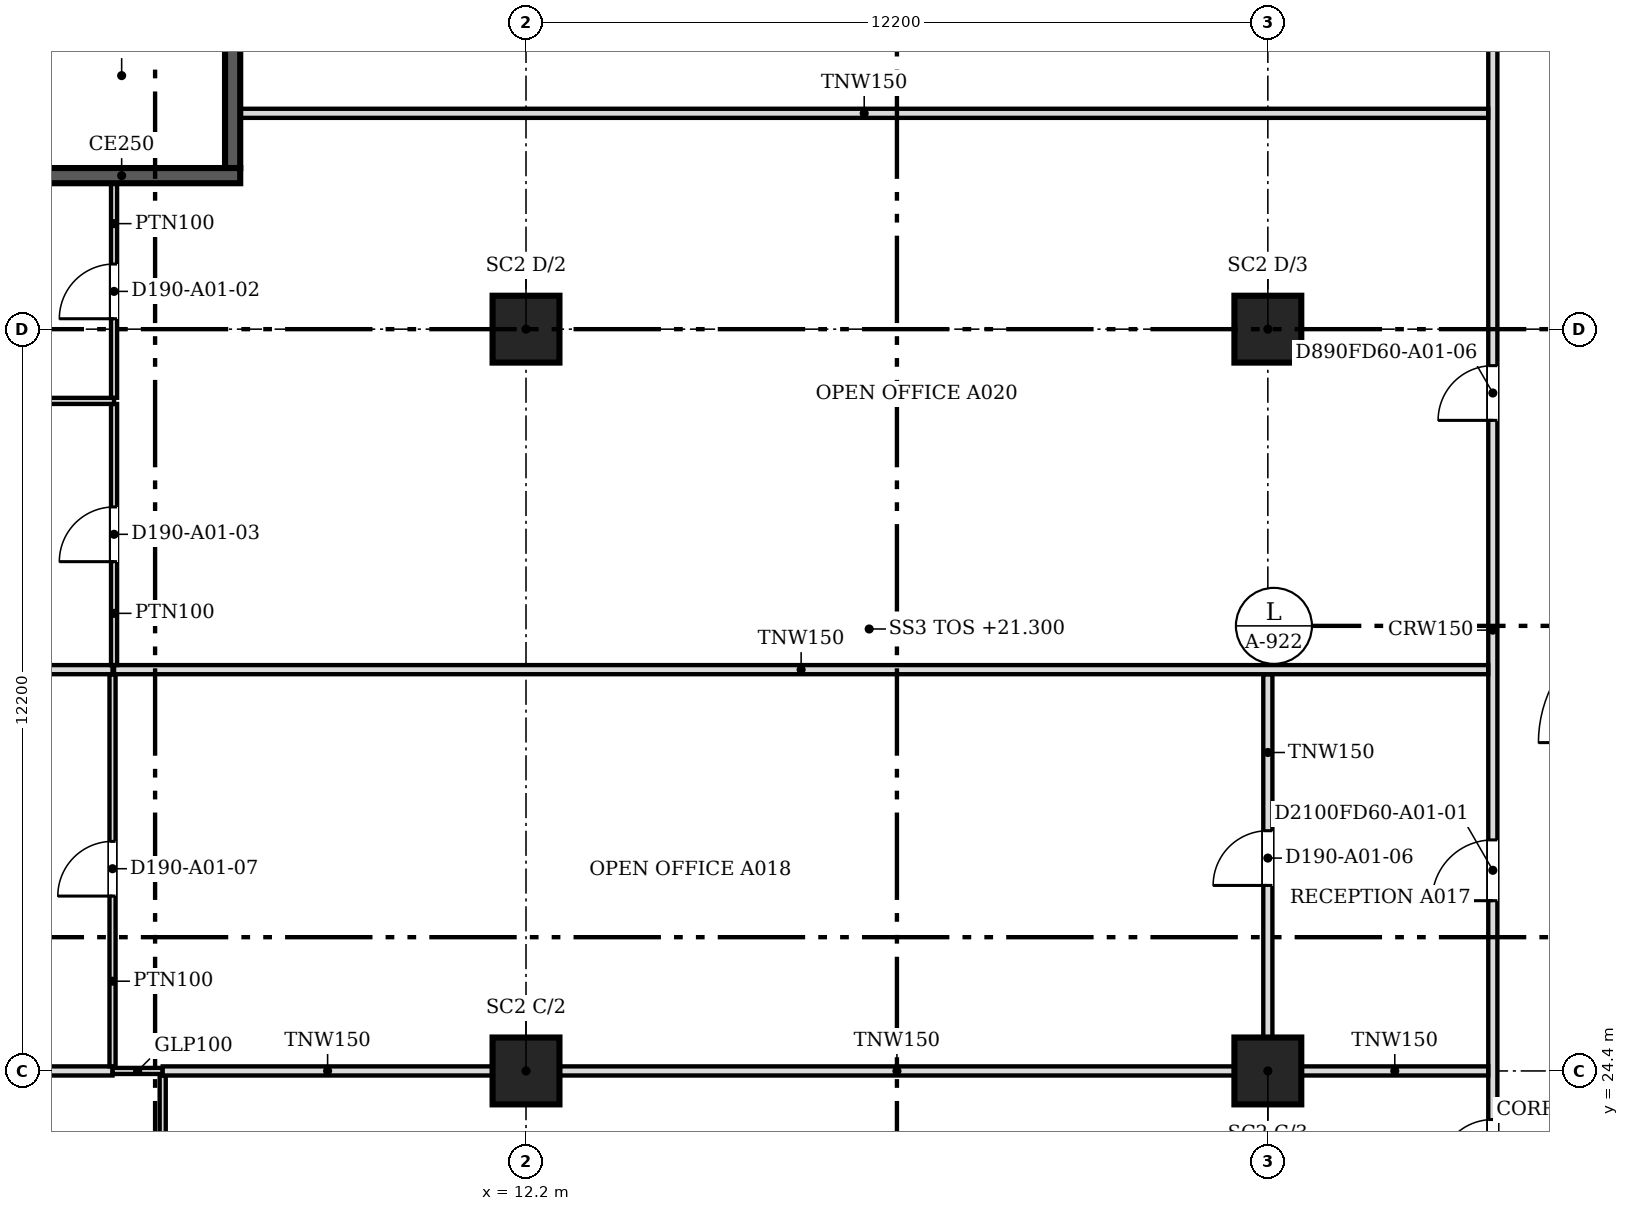
"""IFC4 building model, lengths in metres.
Left out: names, types, materials, properties, quantities, classifications, styles, units other than length and angle.
Written with IfcOpenShell. Run it as: python <this file> out.ifc"""

import sys

from ifc_helpers import new_model, si_unit, direction, frame, frame_2d, origin, origin_2d, place, context, subcontext, project, spatial, rectangle, extrude, source, transform, mapped, element, fill, save


model = new_model("IFC4")
c1 = context("Model", 3, precision=1e-05, world=origin(), true_north=direction((0.0, 1.0)))
c2 = subcontext(c1, "Body", "Model", "MODEL_VIEW")
j1 = project(units=[si_unit("LENGTHUNIT", "METRE"), si_unit("PLANEANGLEUNIT", "RADIAN")], contexts=[c1])
p1 = place(None, origin())
s1 = spatial("IfcSite", under=j1, at=p1, CompositionType="ELEMENT")
p2 = place(p1, origin())
s2 = spatial("IfcBuilding", under=s1, at=p2, CompositionType="ELEMENT")
p3 = place(p2, frame((0.0, 0.0, 21.3)))
s3 = spatial("IfcBuildingStorey", under=s2, at=p3, CompositionType="ELEMENT", Elevation=21.3)
for number, where, z_axis, x_axis in (
    (1, (12.2, 24.4, 0.0), (0.0, 0.0, 1.0), (1.0, 0.0, 0.0)),
    (2, (12.2, 36.6, 0.0), (0.0, 0.0, 1.0), (1.0, 0.0, 0.0)),
    (3, (24.4, 24.4, 0.0), (0.0, 0.0, 1.0), (1.0, 0.0, 0.0)),
    (4, (24.4, 36.6, 0.0), (0.0, 0.0, 1.0), (1.0, 0.0, 0.0)),
):
    element("IfcColumn", number, at=place(p3, frame(where, z_axis=z_axis, x_axis=x_axis)), inside=s3, PredefinedType="COLUMN", context=c2, shape_type="SweptSolid", body=[
        extrude(rectangle(XDim=1.1, YDim=1.1, at=origin_2d()), origin(), (0.0, 0.0, 1.0), 4.3),
    ])
p4 = place(p3, frame((7.5, 39.125, 0.0), z_axis=(0.0, 0.0, 1.0), x_axis=(-1.0, 0.0, 0.0)))
e5 = element("IfcWall", 5, at=p4, inside=s3, PredefinedType="SOLIDWALL", context=c2, shape_type="SweptSolid", body=[
    extrude(rectangle(XDim=3.9, YDim=0.25, at=frame_2d((1.95, 0.0))), origin(), (0.0, 0.0, 1.0), 4.5),
])
p5 = place(p3, frame((7.375, 47.25, 0.0), z_axis=(0.0, 0.0, 1.0), x_axis=(0.0, -1.0, 0.0)))
e6 = element("IfcWall", 6, at=p5, inside=s3, PredefinedType="SOLIDWALL", context=c2, shape_type="SweptSolid", body=[
    extrude(rectangle(XDim=8.0, YDim=0.25, at=frame_2d((4.0, 0.0))), origin(), (0.0, 0.0, 1.0), 4.5),
])
m1 = source(origin(), c2, "Body", "SweptSolid", [
    extrude(rectangle(XDim=1.2, YDim=2.1, at=frame_2d((0.6, 1.05))), frame((0.0, 0.135, 0.0), z_axis=(0.0, -1.0, 0.0), x_axis=(1.0, 0.0, 0.0)), (0.0, 0.0, 1.0), 0.27),
])
p6 = place(p5, frame((0.15, 0.0, 0.0)))
e7 = element("IfcOpeningElement", 7, at=p6, cuts=e6, PredefinedType="OPENING", context=c2, shape_type="MappedRepresentation", body=[
    mapped(m1, transform((0.0, 0.0, 0.0), scale=1.0)),
])
p7 = place(p3, frame((6.225, 18.8, 0.0), z_axis=(0.0, 0.0, 1.0), x_axis=(0.0, 1.0, 0.0)))
e8 = element("IfcWall", 8, at=p7, inside=s3, PredefinedType="PARTITIONING", context=c2, shape_type="SweptSolid", body=[
    extrude(rectangle(XDim=5.524, YDim=0.1, at=frame_2d((2.762, 0.0))), origin(), (0.0, 0.0, 1.0), 3.767),
])
m2 = source(origin(), c2, "Body", "SweptSolid", [
    extrude(rectangle(XDim=0.9, YDim=2.1, at=frame_2d((0.45, 1.05))), frame((0.0, 0.06, 0.0), z_axis=(0.0, -1.0, 0.0), x_axis=(1.0, 0.0, 0.0)), (0.0, 0.0, 1.0), 0.12),
])
p8 = place(p7, frame((2.3, 0.0, 0.0)))
e9 = element("IfcOpeningElement", 9, at=p8, cuts=e8, PredefinedType="OPENING", context=c2, shape_type="MappedRepresentation", body=[
    mapped(m2, transform((0.0, 0.0, 0.0), scale=1.0)),
])
p9 = place(p3, frame((28.1, 18.8, 0.0), z_axis=(0.0, 0.0, 1.0), x_axis=(0.0, 1.0, 0.0)))
e10 = element("IfcWall", 10, at=p9, inside=s3, PredefinedType="PARTITIONING", context=c2, shape_type="SweptSolid", body=[
    extrude(rectangle(XDim=26.424, YDim=0.15, at=frame_2d((13.212, 0.0))), origin(), (0.0, 0.0, 1.0), 3.767),
])
m3 = source(origin(), c2, "Body", "SweptSolid", [
    extrude(rectangle(XDim=0.9, YDim=2.1, at=frame_2d((0.45, 1.05))), frame((0.0, 0.085, 0.0), z_axis=(0.0, -1.0, 0.0), x_axis=(1.0, 0.0, 0.0)), (0.0, 0.0, 1.0), 0.17),
])
p10 = place(p9, frame((3.901, 0.0, 0.0)))
e11 = element("IfcOpeningElement", 11, at=p10, cuts=e10, PredefinedType="OPENING", context=c2, shape_type="MappedRepresentation", body=[
    mapped(m3, transform((0.0, 0.0, 0.0), scale=1.0)),
])
p11 = place(p9, frame((23.451, 0.0, 0.0)))
e12 = element("IfcOpeningElement", 12, at=p11, cuts=e10, PredefinedType="OPENING", context=c2, shape_type="MappedRepresentation", body=[
    mapped(m3, transform((0.0, 0.0, 0.0), scale=1.0)),
])
m4 = source(origin(), c2, "Body", "SweptSolid", [
    extrude(rectangle(XDim=1.0, YDim=2.1, at=frame_2d((0.5, 1.05))), frame((0.0, 0.085, 0.0), z_axis=(0.0, -1.0, 0.0), x_axis=(1.0, 0.0, 0.0)), (0.0, 0.0, 1.0), 0.17),
])
p12 = place(p9, frame((8.4, 0.0, 0.0)))
e13 = element("IfcOpeningElement", 13, at=p12, cuts=e10, PredefinedType="OPENING", context=c2, shape_type="MappedRepresentation", body=[
    mapped(m4, transform((0.0, 0.0, 0.0), scale=1.0)),
])
p13 = place(p9, frame((16.3, 0.0, 0.0)))
e14 = element("IfcOpeningElement", 14, at=p13, cuts=e10, PredefinedType="OPENING", context=c2, shape_type="MappedRepresentation", body=[
    mapped(m3, transform((0.0, 0.0, 0.0), scale=1.0)),
])
p14 = place(p3, frame((0.536, 24.4, 0.0), z_axis=(0.0, 0.0, 1.0), x_axis=(1.0, 0.0, 0.0)))
e15 = element("IfcWall", 15, at=p14, inside=s3, PredefinedType="PARTITIONING", context=c2, shape_type="SweptSolid", body=[
    extrude(rectangle(XDim=4.864, YDim=0.15, at=frame_2d((2.432, 0.0))), origin(), (0.0, 0.0, 1.0), 3.767),
])
p15 = place(p3, frame((5.401, 24.4, 0.0), z_axis=(0.0, 0.0, 1.0), x_axis=(1.0, 0.0, 0.0)))
e16 = element("IfcWall", 16, at=p15, inside=s3, PredefinedType="PARTITIONING", context=c2, shape_type="SweptSolid", body=[
    extrude(rectangle(XDim=0.823, YDim=0.1, at=frame_2d((0.412, 0.0))), origin(), (0.0, 0.0, 1.0), 3.767),
])
p16 = place(p3, frame((6.225, 24.4, 0.0), z_axis=(0.0, 0.0, 1.0), x_axis=(1.0, 0.0, 0.0)))
e17 = element("IfcWall", 17, at=p16, inside=s3, PredefinedType="PARTITIONING", context=c2, shape_type="SweptSolid", body=[
    extrude(rectangle(XDim=5.424, YDim=0.15, at=frame_2d((2.712, 0.0))), origin(), (0.0, 0.0, 1.0), 3.767),
])
p17 = place(p3, frame((12.751, 24.4, 0.0), z_axis=(0.0, 0.0, 1.0), x_axis=(1.0, 0.0, 0.0)))
e18 = element("IfcWall", 18, at=p17, inside=s3, PredefinedType="PARTITIONING", context=c2, shape_type="SweptSolid", body=[
    extrude(rectangle(XDim=11.098, YDim=0.15, at=frame_2d((5.549, 0.0))), origin(), (0.0, 0.0, 1.0), 3.767),
])
p18 = place(p3, frame((24.951, 24.4, 0.0), z_axis=(0.0, 0.0, 1.0), x_axis=(1.0, 0.0, 0.0)))
e19 = element("IfcWall", 19, at=p18, inside=s3, PredefinedType="PARTITIONING", context=c2, shape_type="SweptSolid", body=[
    extrude(rectangle(XDim=3.073, YDim=0.15, at=frame_2d((1.537, 0.0))), origin(), (0.0, 0.0, 1.0), 3.767),
])
p19 = place(p3, frame((5.4, 24.476, 0.0), z_axis=(0.0, 0.0, 1.0), x_axis=(0.0, 1.0, 0.0)))
e20 = element("IfcWall", 20, at=p19, inside=s3, PredefinedType="PARTITIONING", context=c2, shape_type="SweptSolid", body=[
    extrude(rectangle(XDim=6.448, YDim=0.1, at=frame_2d((3.224, 0.0))), origin(), (0.0, 0.0, 1.0), 3.767),
])
p20 = place(p19, frame((2.8, 0.0, 0.0)))
e21 = element("IfcOpeningElement", 21, at=p20, cuts=e20, PredefinedType="OPENING", context=c2, shape_type="MappedRepresentation", body=[
    mapped(m2, transform((0.0, 0.0, 0.0), scale=1.0)),
])
p21 = place(p3, frame((24.4, 24.951, 0.0), z_axis=(0.0, 0.0, 1.0), x_axis=(0.0, 1.0, 0.0)))
e22 = element("IfcWall", 22, at=p21, inside=s3, PredefinedType="PARTITIONING", context=c2, shape_type="SweptSolid", body=[
    extrude(rectangle(XDim=5.973, YDim=0.15, at=frame_2d((2.987, 0.0))), origin(), (0.0, 0.0, 1.0), 3.767),
])
p22 = place(p21, frame((2.5, 0.0, 0.0)))
e23 = element("IfcOpeningElement", 23, at=p22, cuts=e22, PredefinedType="OPENING", context=c2, shape_type="MappedRepresentation", body=[
    mapped(m3, transform((0.0, 0.0, 0.0), scale=1.0)),
])
p23 = place(p3, frame((0.5, 31.0, 0.0), z_axis=(0.0, 0.0, 1.0), x_axis=(1.0, 0.0, 0.0)))
e24 = element("IfcWall", 24, at=p23, inside=s3, PredefinedType="PARTITIONING", context=c2, shape_type="SweptSolid", body=[
    extrude(rectangle(XDim=4.9, YDim=0.15, at=frame_2d((2.45, 0.0))), origin(), (0.0, 0.0, 1.0), 3.767),
])
p24 = place(p3, frame((5.425, 31.0, 0.0), z_axis=(0.0, 0.0, 1.0), x_axis=(1.0, 0.0, 0.0)))
e25 = element("IfcWall", 25, at=p24, inside=s3, PredefinedType="PARTITIONING", context=c2, shape_type="SweptSolid", body=[
    extrude(rectangle(XDim=22.599, YDim=0.15, at=frame_2d((11.299, 0.0))), origin(), (0.0, 0.0, 1.0), 3.767),
])
p25 = place(p3, frame((5.425, 31.076, 0.0), z_axis=(0.0, 0.0, 1.0), x_axis=(0.0, 1.0, 0.0)))
e26 = element("IfcWall", 26, at=p25, inside=s3, PredefinedType="PARTITIONING", context=c2, shape_type="SweptSolid", body=[
    extrude(rectangle(XDim=4.293, YDim=0.1, at=frame_2d((2.147, 0.0))), origin(), (0.0, 0.0, 1.0), 3.767),
])
p26 = place(p25, frame((1.7, 0.0, 0.0)))
e27 = element("IfcOpeningElement", 27, at=p26, cuts=e26, PredefinedType="OPENING", context=c2, shape_type="MappedRepresentation", body=[
    mapped(m2, transform((0.0, 0.0, 0.0), scale=1.0)),
])
p27 = place(p3, frame((0.5, 35.42, 0.0), z_axis=(0.0, 0.0, 1.0), x_axis=(1.0, 0.0, 0.0)))
e28 = element("IfcWall", 28, at=p27, inside=s3, PredefinedType="PARTITIONING", context=c2, shape_type="SweptSolid", body=[
    extrude(rectangle(XDim=4.925, YDim=0.1, at=frame_2d((2.462, 0.0))), origin(), (0.0, 0.0, 1.0), 3.767),
])
p28 = place(p3, frame((5.425, 35.471, 0.0), z_axis=(0.0, 0.0, 1.0), x_axis=(0.0, 1.0, 0.0)))
e29 = element("IfcWall", 29, at=p28, inside=s3, PredefinedType="PARTITIONING", context=c2, shape_type="SweptSolid", body=[
    extrude(rectangle(XDim=3.529, YDim=0.1, at=frame_2d((1.764, 0.0))), origin(), (0.0, 0.0, 1.0), 3.767),
])
p29 = place(p28, frame((1.3, 0.0, 0.0)))
e30 = element("IfcOpeningElement", 30, at=p29, cuts=e29, PredefinedType="OPENING", context=c2, shape_type="MappedRepresentation", body=[
    mapped(m2, transform((0.0, 0.0, 0.0), scale=1.0)),
])
p30 = place(p3, frame((7.5, 40.15, 0.0), z_axis=(0.0, 0.0, 1.0), x_axis=(1.0, 0.0, 0.0)))
e31 = element("IfcWall", 31, at=p30, inside=s3, PredefinedType="PARTITIONING", context=c2, shape_type="SweptSolid", body=[
    extrude(rectangle(XDim=20.524, YDim=0.15, at=frame_2d((10.262, 0.0))), origin(), (0.0, 0.0, 1.0), 3.767),
])
m5 = source(origin(), c2, "Body", "SweptSolid", [
    extrude(rectangle(XDim=0.9, YDim=2.1, at=frame_2d((0.45, 1.05))), frame((0.0, 0.025, 0.0), z_axis=(0.0, -1.0, 0.0), x_axis=(1.0, 0.0, 0.0)), (0.0, 0.0, 1.0), 0.05),
])
p31 = place(p10, origin())
e32 = element("IfcDoor", 32, at=p31, inside=s3, OperationType="SINGLE_SWING_LEFT", PredefinedType="DOOR", context=c2, shape_type="MappedRepresentation", body=[
    mapped(m5, transform((0.0, 0.0, 0.0), scale=1.0)),
])
fill(e11, e32)
p32 = place(p29, origin())
e33 = element("IfcDoor", 33, at=p32, inside=s3, OperationType="SINGLE_SWING_LEFT", PredefinedType="DOOR", context=c2, shape_type="MappedRepresentation", body=[
    mapped(m5, transform((0.0, 0.0, 0.0), scale=1.0)),
])
fill(e30, e33)
p33 = place(p26, origin())
e34 = element("IfcDoor", 34, at=p33, inside=s3, OperationType="SINGLE_SWING_LEFT", PredefinedType="DOOR", context=c2, shape_type="MappedRepresentation", body=[
    mapped(m5, transform((0.0, 0.0, 0.0), scale=1.0)),
])
fill(e27, e34)
p34 = place(p22, origin())
e35 = element("IfcDoor", 35, at=p34, inside=s3, OperationType="SINGLE_SWING_LEFT", PredefinedType="DOOR", context=c2, shape_type="MappedRepresentation", body=[
    mapped(m5, transform((0.0, 0.0, 0.0), scale=1.0)),
])
fill(e23, e35)
p35 = place(p20, origin())
e36 = element("IfcDoor", 36, at=p35, inside=s3, OperationType="SINGLE_SWING_LEFT", PredefinedType="DOOR", context=c2, shape_type="MappedRepresentation", body=[
    mapped(m5, transform((0.0, 0.0, 0.0), scale=1.0)),
])
fill(e21, e36)
m6 = source(origin(), c2, "Body", "SweptSolid", [
    extrude(rectangle(XDim=1.0, YDim=2.1, at=frame_2d((0.5, 1.05))), frame((0.0, 0.025, 0.0), z_axis=(0.0, -1.0, 0.0), x_axis=(1.0, 0.0, 0.0)), (0.0, 0.0, 1.0), 0.05),
])
p36 = place(p12, origin())
e37 = element("IfcDoor", 37, at=p36, inside=s3, OperationType="SINGLE_SWING_LEFT", PredefinedType="DOOR", context=c2, shape_type="MappedRepresentation", body=[
    mapped(m6, transform((0.0, 0.0, 0.0), scale=1.0)),
])
fill(e13, e37)
p37 = place(p13, origin())
e38 = element("IfcDoor", 38, at=p37, inside=s3, OperationType="SINGLE_SWING_LEFT", PredefinedType="DOOR", context=c2, shape_type="MappedRepresentation", body=[
    mapped(m5, transform((0.0, 0.0, 0.0), scale=1.0)),
])
fill(e14, e38)
save(model, sys.argv[1])
